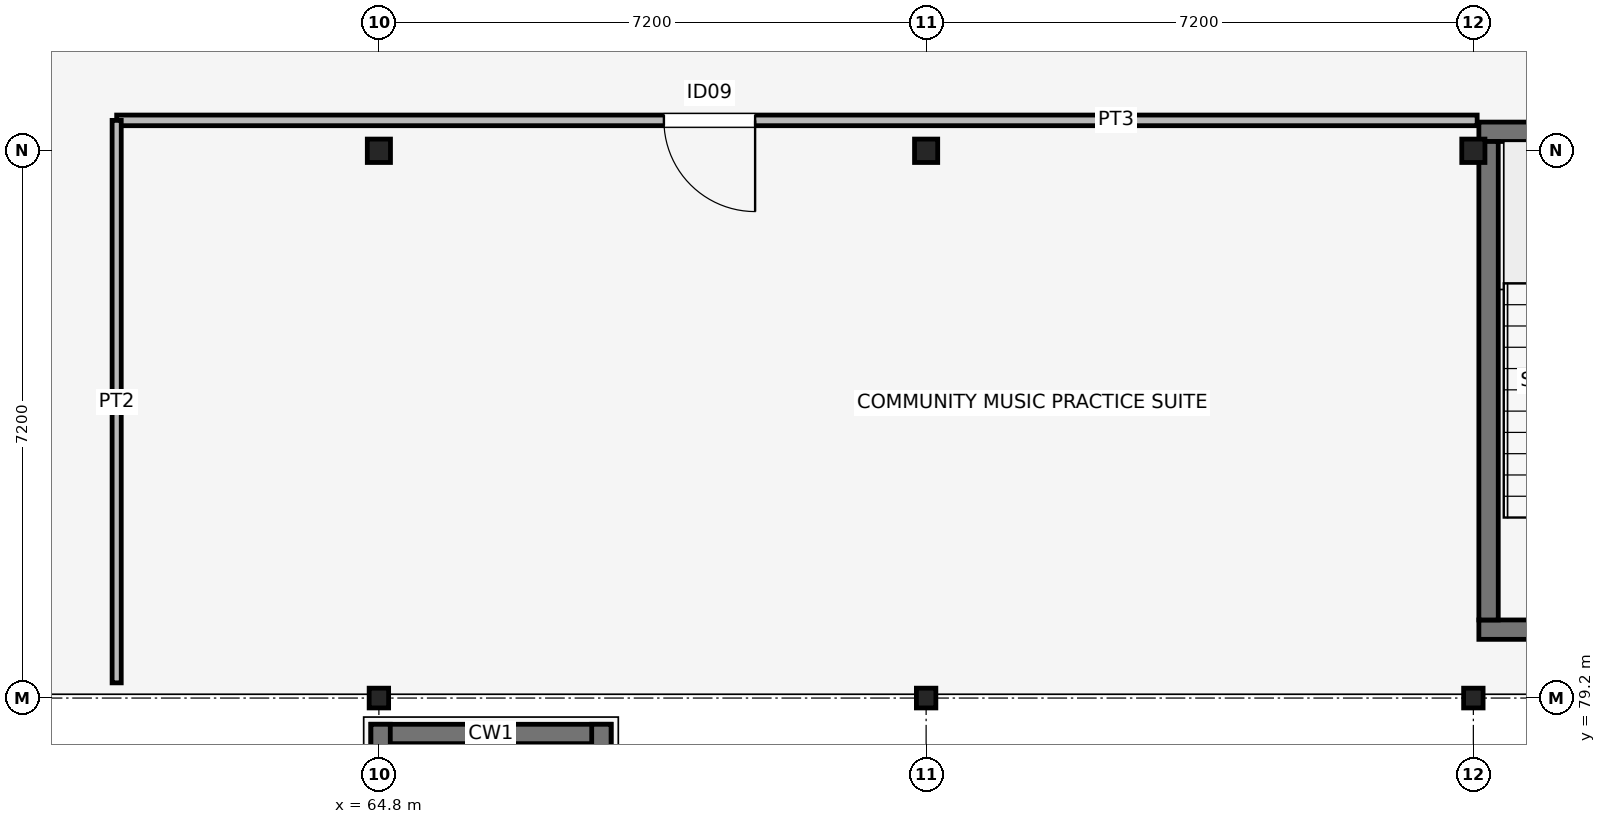
"""IFC4 building model, lengths in metres.
Left out: names, types, materials, properties, quantities, classifications, styles, units other than length and angle.
Written with IfcOpenShell. Run it as: python <this file> out.ifc"""

import sys

from ifc_helpers import new_model, si_unit, direction, frame, frame_2d, origin, origin_2d, place, context, subcontext, project, spatial, rectangle, i_section, extrude, element, fill, save


model = new_model("IFC4")
c1 = context("Model", 3, precision=1e-05, world=origin(), true_north=direction((0.0, 1.0)))
c2 = subcontext(c1, "Body", "Model", "MODEL_VIEW")
j1 = project(units=[si_unit("LENGTHUNIT", "METRE"), si_unit("PLANEANGLEUNIT", "RADIAN")], contexts=[c1])
p1 = place(None, origin())
s1 = spatial("IfcSite", under=j1, at=p1, CompositionType="ELEMENT")
p2 = place(p1, origin())
s2 = spatial("IfcBuilding", under=s1, at=p2, CompositionType="ELEMENT")
p3 = place(p2, origin())
s3 = spatial("IfcBuildingStorey", under=s2, at=p3, CompositionType="ELEMENT", Elevation=0.0)
p4 = place(p3, frame((64.695, 78.728, 0.0), z_axis=(0.0, 0.0, 1.0), x_axis=(1.0, 0.0, 0.0)))
e1 = element("IfcWall", 1, at=p4, inside=s3, PredefinedType="SHEAR", context=c2, shape_type="SweptSolid", body=[
    extrude(rectangle(XDim=3.16, YDim=0.255, at=frame_2d((1.58, 0.0))), origin(), (0.0, 0.0, 1.0), 4.5),
])
for number, where, z_axis, x_axis in (
    (2, (64.823, 72.0, 0.0), (0.0, 0.0, 1.0), (0.0, 1.0, 0.0)),
    (3, (67.728, 72.0, 0.0), (0.0, 0.0, 1.0), (0.0, 1.0, 0.0)),
):
    element("IfcWall", number, at=place(p3, frame(where, z_axis=z_axis, x_axis=x_axis)), inside=s3, PredefinedType="SHEAR", context=c2, shape_type="SweptSolid", body=[
        extrude(rectangle(XDim=6.855, YDim=0.255, at=frame_2d((3.427, 0.0))), origin(), (0.0, 0.0, 1.0), 4.5),
    ])
p5 = place(p3, frame((64.8, 79.2, 0.0), z_axis=(0.0, 0.0, 1.0), x_axis=(1.0, 0.0, 0.0)))
e4 = element("IfcColumn", 4, at=p5, inside=s3, PredefinedType="COLUMN", context=c2, shape_type="SweptSolid", body=[
    extrude(i_section(OverallWidth=0.256, OverallDepth=0.26, WebThickness=0.01, FlangeThickness=0.017, FilletRadius=0.013, at=origin_2d()), origin(), (0.0, 0.0, 1.0), 4.5),
])
p6 = place(p3, frame((64.8, 86.4, 0.0), z_axis=(0.0, 0.0, 1.0), x_axis=(1.0, 0.0, 0.0)))
e5 = element("IfcColumn", 5, at=p6, inside=s3, PredefinedType="COLUMN", context=c2, shape_type="SweptSolid", body=[
    extrude(i_section(OverallWidth=0.305, OverallDepth=0.308, WebThickness=0.01, FlangeThickness=0.015, FilletRadius=0.017, at=origin_2d()), origin(), (0.0, 0.0, 1.0), 4.5),
])
p7 = place(p3, frame((72.0, 79.2, 0.0), z_axis=(0.0, 0.0, 1.0), x_axis=(1.0, 0.0, 0.0)))
e6 = element("IfcColumn", 6, at=p7, inside=s3, PredefinedType="COLUMN", context=c2, shape_type="SweptSolid", body=[
    extrude(i_section(OverallWidth=0.256, OverallDepth=0.26, WebThickness=0.01, FlangeThickness=0.017, FilletRadius=0.013, at=origin_2d()), origin(), (0.0, 0.0, 1.0), 4.5),
])
p8 = place(p3, frame((72.0, 86.4, 0.0), z_axis=(0.0, 0.0, 1.0), x_axis=(1.0, 0.0, 0.0)))
e7 = element("IfcColumn", 7, at=p8, inside=s3, PredefinedType="COLUMN", context=c2, shape_type="SweptSolid", body=[
    extrude(i_section(OverallWidth=0.305, OverallDepth=0.308, WebThickness=0.01, FlangeThickness=0.015, FilletRadius=0.017, at=origin_2d()), origin(), (0.0, 0.0, 1.0), 4.5),
])
p9 = place(p3, frame((79.2, 79.2, 0.0), z_axis=(0.0, 0.0, 1.0), x_axis=(1.0, 0.0, 0.0)))
e8 = element("IfcColumn", 8, at=p9, inside=s3, PredefinedType="COLUMN", context=c2, shape_type="SweptSolid", body=[
    extrude(i_section(OverallWidth=0.256, OverallDepth=0.26, WebThickness=0.01, FlangeThickness=0.017, FilletRadius=0.013, at=origin_2d()), origin(), (0.0, 0.0, 1.0), 4.5),
])
p10 = place(p3, frame((79.2, 86.4, 0.0), z_axis=(0.0, 0.0, 1.0), x_axis=(1.0, 0.0, 0.0)))
e9 = element("IfcColumn", 9, at=p10, inside=s3, PredefinedType="COLUMN", context=c2, shape_type="SweptSolid", body=[
    extrude(i_section(OverallWidth=0.305, OverallDepth=0.308, WebThickness=0.01, FlangeThickness=0.015, FilletRadius=0.017, at=origin_2d()), origin(), (0.0, 0.0, 1.0), 4.5),
])
for number, where, z_axis, x_axis in (
    (10, (79.272, 80.1, 0.0), (0.0, 0.0, 1.0), (1.0, 0.0, 0.0)),
    (11, (79.272, 86.65, 0.0), (0.0, 0.0, 1.0), (1.0, 0.0, 0.0)),
):
    element("IfcWall", number, at=place(p3, frame(where, z_axis=z_axis, x_axis=x_axis)), inside=s3, PredefinedType="SHEAR", context=c2, shape_type="SweptSolid", body=[
        extrude(rectangle(XDim=3.305, YDim=0.255, at=frame_2d((1.652, 0.0))), origin(), (0.0, 0.0, 1.0), 4.5),
    ])
p11 = place(p3, frame((79.4, 80.228, 0.0), z_axis=(0.0, 0.0, 1.0), x_axis=(0.0, 1.0, 0.0)))
e12 = element("IfcWall", 12, at=p11, inside=s3, PredefinedType="SHEAR", context=c2, shape_type="SweptSolid", body=[
    extrude(rectangle(XDim=6.295, YDim=0.255, at=frame_2d((3.147, 0.0))), origin(), (0.0, 0.0, 1.0), 4.5),
])
p12 = place(p3, frame((61.35, 86.8, 0.0), z_axis=(0.0, 0.0, 1.0), x_axis=(1.0, 0.0, 0.0)))
e13 = element("IfcWall", 13, at=p12, inside=s3, PredefinedType="PARTITIONING", context=c2, shape_type="SweptSolid", body=[
    extrude(rectangle(XDim=17.9, YDim=0.14, at=frame_2d((8.95, 0.0))), origin(), (0.0, 0.0, 1.0), 3.5),
])
p13 = place(p12, frame((8.4, 0.0, 0.0), z_axis=(0.0, 0.0, 1.0), x_axis=(-1.0, 0.0, 0.0)))
e14 = element("IfcOpeningElement", 14, at=p13, cuts=e13, PredefinedType="OPENING", context=c2, shape_type="SweptSolid", body=[
    extrude(rectangle(XDim=1.2, YDim=2.18, at=frame_2d((0.6, 1.09))), frame((0.0, 0.08, 0.0), z_axis=(0.0, -1.0, 0.0), x_axis=(1.0, 0.0, 0.0)), (0.0, 0.0, 1.0), 0.16),
])
p14 = place(p3, frame((61.35, 79.4, 0.0), z_axis=(0.0, 0.0, 1.0), x_axis=(0.0, 1.0, 0.0)))
e15 = element("IfcWall", 15, at=p14, inside=s3, PredefinedType="PARTITIONING", context=c2, shape_type="SweptSolid", body=[
    extrude(rectangle(XDim=7.4, YDim=0.12, at=frame_2d((3.7, 0.0))), origin(), (0.0, 0.0, 1.0), 3.5),
])
p15 = place(p13, origin())
e16 = element("IfcDoor", 16, at=p15, inside=s3, OperationType="SINGLE_SWING_RIGHT", PredefinedType="DOOR", context=c2, shape_type="SweptSolid", body=[
    extrude(rectangle(XDim=1.2, YDim=2.18, at=frame_2d((0.6, 1.09))), frame((0.0, 0.025, 0.0), z_axis=(0.0, -1.0, 0.0), x_axis=(1.0, 0.0, 0.0)), (0.0, 0.0, 1.0), 0.05),
])
fill(e14, e16)
save(model, sys.argv[1])
